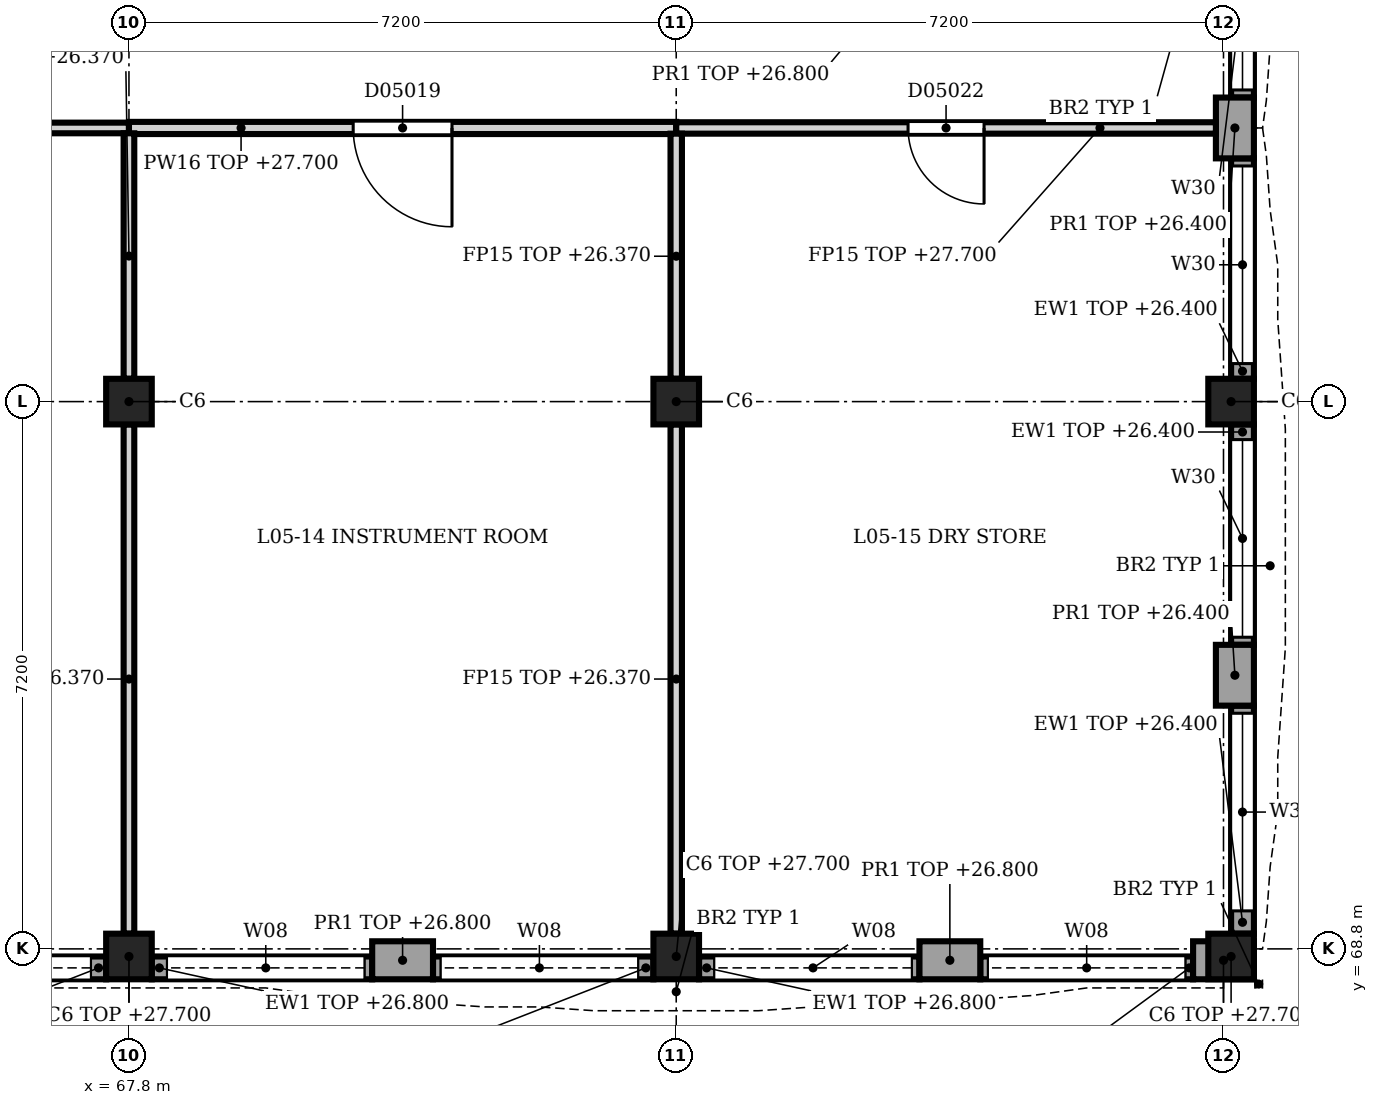
"""IFC4 building model, lengths in metres.
Left out: names, types, materials, properties, quantities, classifications, styles, units other than length and angle.
Written with IfcOpenShell. Run it as: python <this file> out.ifc"""

import sys

from ifc_helpers import new_model, si_unit, direction, frame, frame_2d, origin, origin_2d, place, context, subcontext, project, spatial, rectangle, extrude, element, fill, save


model = new_model("IFC4")
c1 = context("Model", 3, precision=1e-05, world=origin(), true_north=direction((0.0, 1.0)))
c2 = subcontext(c1, "Body", "Model", "MODEL_VIEW")
j1 = project(units=[si_unit("LENGTHUNIT", "METRE"), si_unit("PLANEANGLEUNIT", "RADIAN")], contexts=[c1])
p1 = place(None, origin())
s1 = spatial("IfcSite", under=j1, at=p1, CompositionType="ELEMENT")
p2 = place(p1, origin())
s2 = spatial("IfcBuilding", under=s1, at=p2, CompositionType="ELEMENT")
p3 = place(p2, frame((0.0, 0.0, 23.4)))
s3 = spatial("IfcBuildingStorey", under=s2, at=p3, CompositionType="ELEMENT", Elevation=23.4)
p4 = place(p3, frame((67.8, 68.7, 0.0), z_axis=(0.0, 0.0, 1.0), x_axis=(1.0, 0.0, 0.0)))
e1 = element("IfcColumn", 1, at=p4, inside=s3, PredefinedType="COLUMN", context=c2, shape_type="SweptSolid", body=[
    extrude(rectangle(XDim=0.6, YDim=0.6, at=origin_2d()), origin(), (0.0, 0.0, 1.0), 4.3),
])
p5 = place(p3, frame((67.8, 76.0, 0.0), z_axis=(0.0, 0.0, 1.0), x_axis=(1.0, 0.0, 0.0)))
e2 = element("IfcColumn", 2, at=p5, inside=s3, PredefinedType="COLUMN", context=c2, shape_type="SweptSolid", body=[
    extrude(rectangle(XDim=0.6, YDim=0.6, at=origin_2d()), origin(), (0.0, 0.0, 1.0), 4.5),
])
p6 = place(p3, frame((75.0, 68.7, 0.0), z_axis=(0.0, 0.0, 1.0), x_axis=(1.0, 0.0, 0.0)))
e3 = element("IfcColumn", 3, at=p6, inside=s3, PredefinedType="COLUMN", context=c2, shape_type="SweptSolid", body=[
    extrude(rectangle(XDim=0.6, YDim=0.6, at=origin_2d()), origin(), (0.0, 0.0, 1.0), 4.3),
])
p7 = place(p3, frame((75.0, 76.0, 0.0), z_axis=(0.0, 0.0, 1.0), x_axis=(1.0, 0.0, 0.0)))
e4 = element("IfcColumn", 4, at=p7, inside=s3, PredefinedType="COLUMN", context=c2, shape_type="SweptSolid", body=[
    extrude(rectangle(XDim=0.6, YDim=0.6, at=origin_2d()), origin(), (0.0, 0.0, 1.0), 4.5),
])
p8 = place(p3, frame((82.3, 68.7, 0.0), z_axis=(0.0, 0.0, 1.0), x_axis=(1.0, 0.0, 0.0)))
e5 = element("IfcColumn", 5, at=p8, inside=s3, PredefinedType="COLUMN", context=c2, shape_type="SweptSolid", body=[
    extrude(rectangle(XDim=0.6, YDim=0.6, at=origin_2d()), origin(), (0.0, 0.0, 1.0), 4.3),
])
p9 = place(p3, frame((82.3, 76.0, 0.0), z_axis=(0.0, 0.0, 1.0), x_axis=(1.0, 0.0, 0.0)))
e6 = element("IfcColumn", 6, at=p9, inside=s3, PredefinedType="COLUMN", context=c2, shape_type="SweptSolid", body=[
    extrude(rectangle(XDim=0.6, YDim=0.6, at=origin_2d()), origin(), (0.0, 0.0, 1.0), 4.5),
])
for number, where, z_axis, x_axis in (
    (7, (82.6, 68.65, 0.0), (0.0, 0.0, 1.0), (-1.0, 0.0, 0.0)),
    (8, (79.0, 68.65, 0.0), (0.0, 0.0, 1.0), (-1.0, 0.0, 0.0)),
    (9, (71.8, 68.65, 0.0), (0.0, 0.0, 1.0), (-1.0, 0.0, 0.0)),
):
    element("IfcWall", number, at=place(p3, frame(where, z_axis=z_axis, x_axis=x_axis)), inside=s3, PredefinedType="SOLIDWALL", context=c2, shape_type="SweptSolid", body=[
        extrude(rectangle(XDim=0.8, YDim=0.5, at=frame_2d((0.4, 0.0))), origin(), (0.0, 0.0, 1.0), 3.4),
    ])
p10 = place(p3, frame((81.8, 68.55, 0.0), z_axis=(0.0, 0.0, 1.0), x_axis=(-1.0, 0.0, 0.0)))
e10 = element("IfcWall", 10, at=p10, inside=s3, PredefinedType="SOLIDWALL", context=c2, shape_type="SweptSolid", body=[
    extrude(rectangle(XDim=2.8, YDim=0.3, at=frame_2d((1.4, 0.0))), origin(), (0.0, 0.0, 1.0), 3.4),
])
p11 = place(p10, frame((0.1, 0.0, 1.2)))
e11 = element("IfcOpeningElement", 11, at=p11, cuts=e10, PredefinedType="OPENING", context=c2, shape_type="SweptSolid", body=[
    extrude(rectangle(XDim=2.6, YDim=2.1, at=frame_2d((1.3, 1.05))), frame((0.0, 0.16, 0.0), z_axis=(0.0, -1.0, 0.0), x_axis=(1.0, 0.0, 0.0)), (0.0, 0.0, 1.0), 0.32),
])
p12 = place(p3, frame((78.2, 68.55, 0.0), z_axis=(0.0, 0.0, 1.0), x_axis=(-1.0, 0.0, 0.0)))
e12 = element("IfcWall", 12, at=p12, inside=s3, PredefinedType="SOLIDWALL", context=c2, shape_type="SweptSolid", body=[
    extrude(rectangle(XDim=2.9, YDim=0.3, at=frame_2d((1.45, 0.0))), origin(), (0.0, 0.0, 1.0), 3.4),
])
p13 = place(p12, frame((0.1, 0.0, 1.2)))
e13 = element("IfcOpeningElement", 13, at=p13, cuts=e12, PredefinedType="OPENING", context=c2, shape_type="SweptSolid", body=[
    extrude(rectangle(XDim=2.6, YDim=2.1, at=frame_2d((1.3, 1.05))), frame((0.0, 0.16, 0.0), z_axis=(0.0, -1.0, 0.0), x_axis=(1.0, 0.0, 0.0)), (0.0, 0.0, 1.0), 0.32),
])
p14 = place(p3, frame((74.7, 68.55, 0.0), z_axis=(0.0, 0.0, 1.0), x_axis=(-1.0, 0.0, 0.0)))
e14 = element("IfcWall", 14, at=p14, inside=s3, PredefinedType="SOLIDWALL", context=c2, shape_type="SweptSolid", body=[
    extrude(rectangle(XDim=2.9, YDim=0.3, at=frame_2d((1.45, 0.0))), origin(), (0.0, 0.0, 1.0), 3.4),
])
p15 = place(p14, frame((0.2, 0.0, 1.2)))
e15 = element("IfcOpeningElement", 15, at=p15, cuts=e14, PredefinedType="OPENING", context=c2, shape_type="SweptSolid", body=[
    extrude(rectangle(XDim=2.6, YDim=2.1, at=frame_2d((1.3, 1.05))), frame((0.0, 0.16, 0.0), z_axis=(0.0, -1.0, 0.0), x_axis=(1.0, 0.0, 0.0)), (0.0, 0.0, 1.0), 0.32),
])
p16 = place(p3, frame((71.0, 68.55, 0.0), z_axis=(0.0, 0.0, 1.0), x_axis=(-1.0, 0.0, 0.0)))
e16 = element("IfcWall", 16, at=p16, inside=s3, PredefinedType="SOLIDWALL", context=c2, shape_type="SweptSolid", body=[
    extrude(rectangle(XDim=2.9, YDim=0.3, at=frame_2d((1.45, 0.0))), origin(), (0.0, 0.0, 1.0), 3.4),
])
p17 = place(p16, frame((0.1, 0.0, 1.2)))
e17 = element("IfcOpeningElement", 17, at=p17, cuts=e16, PredefinedType="OPENING", context=c2, shape_type="SweptSolid", body=[
    extrude(rectangle(XDim=2.6, YDim=2.1, at=frame_2d((1.3, 1.05))), frame((0.0, 0.16, 0.0), z_axis=(0.0, -1.0, 0.0), x_axis=(1.0, 0.0, 0.0)), (0.0, 0.0, 1.0), 0.32),
])
p18 = place(p3, frame((67.5, 68.55, 0.0), z_axis=(0.0, 0.0, 1.0), x_axis=(-1.0, 0.0, 0.0)))
e18 = element("IfcWall", 18, at=p18, inside=s3, PredefinedType="SOLIDWALL", context=c2, shape_type="SweptSolid", body=[
    extrude(rectangle(XDim=2.9, YDim=0.3, at=frame_2d((1.45, 0.0))), origin(), (0.0, 0.0, 1.0), 3.4),
])
p19 = place(p18, frame((0.2, 0.0, 1.2)))
e19 = element("IfcOpeningElement", 19, at=p19, cuts=e18, PredefinedType="OPENING", context=c2, shape_type="SweptSolid", body=[
    extrude(rectangle(XDim=2.6, YDim=2.1, at=frame_2d((1.3, 1.05))), frame((0.0, 0.16, 0.0), z_axis=(0.0, -1.0, 0.0), x_axis=(1.0, 0.0, 0.0)), (0.0, 0.0, 1.0), 0.32),
])
for number, where, z_axis, x_axis in (
    (20, (82.35, 80.0, 0.0), (0.0, 0.0, 1.0), (0.0, -1.0, 0.0)),
    (21, (82.35, 72.8, 0.0), (0.0, 0.0, 1.0), (0.0, -1.0, 0.0)),
):
    element("IfcWall", number, at=place(p3, frame(where, z_axis=z_axis, x_axis=x_axis)), inside=s3, PredefinedType="SOLIDWALL", context=c2, shape_type="SweptSolid", body=[
        extrude(rectangle(XDim=0.8, YDim=0.5, at=frame_2d((0.4, 0.0))), origin(), (0.0, 0.0, 1.0), 3.0),
    ])
p20 = place(p3, frame((82.45, 82.9, 0.0), z_axis=(0.0, 0.0, 1.0), x_axis=(0.0, -1.0, 0.0)))
e22 = element("IfcWall", 22, at=p20, inside=s3, PredefinedType="SOLIDWALL", context=c2, shape_type="SweptSolid", body=[
    extrude(rectangle(XDim=2.9, YDim=0.3, at=frame_2d((1.45, 0.0))), origin(), (0.0, 0.0, 1.0), 3.0),
])
p21 = place(p20, frame((0.2, 0.0, 0.9)))
e23 = element("IfcOpeningElement", 23, at=p21, cuts=e22, PredefinedType="OPENING", context=c2, shape_type="SweptSolid", body=[
    extrude(rectangle(XDim=2.6, YDim=1.9, at=frame_2d((1.3, 0.95))), frame((0.0, 0.16, 0.0), z_axis=(0.0, -1.0, 0.0), x_axis=(1.0, 0.0, 0.0)), (0.0, 0.0, 1.0), 0.32),
])
p22 = place(p3, frame((82.45, 79.2, 0.0), z_axis=(0.0, 0.0, 1.0), x_axis=(0.0, -1.0, 0.0)))
e24 = element("IfcWall", 24, at=p22, inside=s3, PredefinedType="SOLIDWALL", context=c2, shape_type="SweptSolid", body=[
    extrude(rectangle(XDim=2.9, YDim=0.3, at=frame_2d((1.45, 0.0))), origin(), (0.0, 0.0, 1.0), 3.0),
])
p23 = place(p22, frame((0.1, 0.0, 0.9)))
e25 = element("IfcOpeningElement", 25, at=p23, cuts=e24, PredefinedType="OPENING", context=c2, shape_type="SweptSolid", body=[
    extrude(rectangle(XDim=2.6, YDim=1.9, at=frame_2d((1.3, 0.95))), frame((0.0, 0.16, 0.0), z_axis=(0.0, -1.0, 0.0), x_axis=(1.0, 0.0, 0.0)), (0.0, 0.0, 1.0), 0.32),
])
p24 = place(p3, frame((82.45, 75.7, 0.0), z_axis=(0.0, 0.0, 1.0), x_axis=(0.0, -1.0, 0.0)))
e26 = element("IfcWall", 26, at=p24, inside=s3, PredefinedType="SOLIDWALL", context=c2, shape_type="SweptSolid", body=[
    extrude(rectangle(XDim=2.9, YDim=0.3, at=frame_2d((1.45, 0.0))), origin(), (0.0, 0.0, 1.0), 3.0),
])
p25 = place(p24, frame((0.2, 0.0, 0.9)))
e27 = element("IfcOpeningElement", 27, at=p25, cuts=e26, PredefinedType="OPENING", context=c2, shape_type="SweptSolid", body=[
    extrude(rectangle(XDim=2.6, YDim=1.9, at=frame_2d((1.3, 0.95))), frame((0.0, 0.16, 0.0), z_axis=(0.0, -1.0, 0.0), x_axis=(1.0, 0.0, 0.0)), (0.0, 0.0, 1.0), 0.32),
])
p26 = place(p3, frame((82.45, 72.0, 0.0), z_axis=(0.0, 0.0, 1.0), x_axis=(0.0, -1.0, 0.0)))
e28 = element("IfcWall", 28, at=p26, inside=s3, PredefinedType="SOLIDWALL", context=c2, shape_type="SweptSolid", body=[
    extrude(rectangle(XDim=3.0, YDim=0.3, at=frame_2d((1.5, 0.0))), origin(), (0.0, 0.0, 1.0), 3.0),
])
p27 = place(p26, frame((0.1, 0.0, 0.9)))
e29 = element("IfcOpeningElement", 29, at=p27, cuts=e28, PredefinedType="OPENING", context=c2, shape_type="SweptSolid", body=[
    extrude(rectangle(XDim=2.6, YDim=1.9, at=frame_2d((1.3, 0.95))), frame((0.0, 0.16, 0.0), z_axis=(0.0, -1.0, 0.0), x_axis=(1.0, 0.0, 0.0)), (0.0, 0.0, 1.0), 0.32),
])
p28 = place(p3, frame((67.8, 79.6, 0.0), z_axis=(0.0, 0.0, 1.0), x_axis=(-1.0, 0.0, 0.0)))
e30 = element("IfcWall", 30, at=p28, inside=s3, PredefinedType="PARTITIONING", context=c2, shape_type="SweptSolid", body=[
    extrude(rectangle(XDim=14.4, YDim=0.14, at=frame_2d((7.2, 0.0))), origin(), (0.0, 0.0, 1.0), 2.97),
])
p29 = place(p28, frame((6.65, 0.0, 0.0)))
e31 = element("IfcOpeningElement", 31, at=p29, cuts=e30, PredefinedType="OPENING", context=c2, shape_type="SweptSolid", body=[
    extrude(rectangle(XDim=1.2, YDim=2.1, at=frame_2d((0.6, 1.05))), frame((0.0, 0.08, 0.0), z_axis=(0.0, -1.0, 0.0), x_axis=(1.0, 0.0, 0.0)), (0.0, 0.0, 1.0), 0.16),
])
p30 = place(p3, frame((75.0, 79.6, 0.0), z_axis=(0.0, 0.0, 1.0), x_axis=(-1.0, 0.0, 0.0)))
e32 = element("IfcWall", 32, at=p30, inside=s3, PredefinedType="PARTITIONING", context=c2, shape_type="SweptSolid", body=[
    extrude(rectangle(XDim=7.2, YDim=0.16, at=frame_2d((3.6, 0.0))), origin(), (0.0, 0.0, 1.0), 4.3),
])
p31 = place(p30, frame((2.95, 0.0, 0.0)))
e33 = element("IfcOpeningElement", 33, at=p31, cuts=e32, PredefinedType="OPENING", context=c2, shape_type="SweptSolid", body=[
    extrude(rectangle(XDim=1.3, YDim=2.2, at=frame_2d((0.65, 1.1))), frame((0.0, 0.09, 0.0), z_axis=(0.0, -1.0, 0.0), x_axis=(1.0, 0.0, 0.0)), (0.0, 0.0, 1.0), 0.18),
])
p32 = place(p3, frame((82.1, 79.6, 0.0), z_axis=(0.0, 0.0, 1.0), x_axis=(-1.0, 0.0, 0.0)))
e34 = element("IfcWall", 34, at=p32, inside=s3, PredefinedType="PARTITIONING", context=c2, shape_type="SweptSolid", body=[
    extrude(rectangle(XDim=7.1, YDim=0.15, at=frame_2d((3.55, 0.0))), origin(), (0.0, 0.0, 1.0), 4.3),
])
p33 = place(p32, frame((3.05, 0.0, 0.0)))
e35 = element("IfcOpeningElement", 35, at=p33, cuts=e34, PredefinedType="OPENING", context=c2, shape_type="SweptSolid", body=[
    extrude(rectangle(XDim=1.0, YDim=2.1, at=frame_2d((0.5, 1.05))), frame((0.0, 0.085, 0.0), z_axis=(0.0, -1.0, 0.0), x_axis=(1.0, 0.0, 0.0)), (0.0, 0.0, 1.0), 0.17),
])
p34 = place(p3, frame((67.8, 69.0, 0.0), z_axis=(0.0, 0.0, 1.0), x_axis=(0.0, 1.0, 0.0)))
e36 = element("IfcWall", 36, at=p34, inside=s3, PredefinedType="PARTITIONING", context=c2, shape_type="SweptSolid", body=[
    extrude(rectangle(XDim=6.7, YDim=0.14, at=frame_2d((3.35, 0.0))), origin(), (0.0, 0.0, 1.0), 2.97),
])
p35 = place(p3, frame((67.8, 76.3, 0.0), z_axis=(0.0, 0.0, 1.0), x_axis=(0.0, 1.0, 0.0)))
e37 = element("IfcWall", 37, at=p35, inside=s3, PredefinedType="PARTITIONING", context=c2, shape_type="SweptSolid", body=[
    extrude(rectangle(XDim=3.23, YDim=0.14, at=frame_2d((1.615, 0.0))), origin(), (0.0, 0.0, 1.0), 2.97),
])
p36 = place(p3, frame((75.0, 69.0, 0.0), z_axis=(0.0, 0.0, 1.0), x_axis=(0.0, 1.0, 0.0)))
e38 = element("IfcWall", 38, at=p36, inside=s3, PredefinedType="PARTITIONING", context=c2, shape_type="SweptSolid", body=[
    extrude(rectangle(XDim=6.7, YDim=0.15, at=frame_2d((3.35, 0.0))), origin(), (0.0, 0.0, 1.0), 2.97),
])
p37 = place(p3, frame((75.0, 76.3, 0.0), z_axis=(0.0, 0.0, 1.0), x_axis=(0.0, 1.0, 0.0)))
e39 = element("IfcWall", 39, at=p37, inside=s3, PredefinedType="PARTITIONING", context=c2, shape_type="SweptSolid", body=[
    extrude(rectangle(XDim=3.225, YDim=0.15, at=frame_2d((1.612, 0.0))), origin(), (0.0, 0.0, 1.0), 2.97),
])
p38 = place(p11, origin())
e40 = element("IfcWindow", 40, at=p38, inside=s3, PartitioningType="SINGLE_PANEL", PredefinedType="WINDOW", context=c2, shape_type="SweptSolid", body=[
    extrude(rectangle(XDim=2.6, YDim=2.1, at=frame_2d((1.3, 1.05))), frame((0.0, 0.03, 0.0), z_axis=(0.0, -1.0, 0.0), x_axis=(1.0, 0.0, 0.0)), (0.0, 0.0, 1.0), 0.06),
])
fill(e11, e40)
p39 = place(p13, origin())
e41 = element("IfcWindow", 41, at=p39, inside=s3, PartitioningType="SINGLE_PANEL", PredefinedType="WINDOW", context=c2, shape_type="SweptSolid", body=[
    extrude(rectangle(XDim=2.6, YDim=2.1, at=frame_2d((1.3, 1.05))), frame((0.0, 0.03, 0.0), z_axis=(0.0, -1.0, 0.0), x_axis=(1.0, 0.0, 0.0)), (0.0, 0.0, 1.0), 0.06),
])
fill(e13, e41)
p40 = place(p15, origin())
e42 = element("IfcWindow", 42, at=p40, inside=s3, PartitioningType="SINGLE_PANEL", PredefinedType="WINDOW", context=c2, shape_type="SweptSolid", body=[
    extrude(rectangle(XDim=2.6, YDim=2.1, at=frame_2d((1.3, 1.05))), frame((0.0, 0.03, 0.0), z_axis=(0.0, -1.0, 0.0), x_axis=(1.0, 0.0, 0.0)), (0.0, 0.0, 1.0), 0.06),
])
fill(e15, e42)
p41 = place(p17, origin())
e43 = element("IfcWindow", 43, at=p41, inside=s3, PartitioningType="SINGLE_PANEL", PredefinedType="WINDOW", context=c2, shape_type="SweptSolid", body=[
    extrude(rectangle(XDim=2.6, YDim=2.1, at=frame_2d((1.3, 1.05))), frame((0.0, 0.03, 0.0), z_axis=(0.0, -1.0, 0.0), x_axis=(1.0, 0.0, 0.0)), (0.0, 0.0, 1.0), 0.06),
])
fill(e17, e43)
p42 = place(p19, origin())
e44 = element("IfcWindow", 44, at=p42, inside=s3, PartitioningType="SINGLE_PANEL", PredefinedType="WINDOW", context=c2, shape_type="SweptSolid", body=[
    extrude(rectangle(XDim=2.6, YDim=2.1, at=frame_2d((1.3, 1.05))), frame((0.0, 0.03, 0.0), z_axis=(0.0, -1.0, 0.0), x_axis=(1.0, 0.0, 0.0)), (0.0, 0.0, 1.0), 0.06),
])
fill(e19, e44)
p43 = place(p21, origin())
e45 = element("IfcWindow", 45, at=p43, inside=s3, PartitioningType="SINGLE_PANEL", PredefinedType="WINDOW", context=c2, shape_type="SweptSolid", body=[
    extrude(rectangle(XDim=2.6, YDim=1.9, at=frame_2d((1.3, 0.95))), frame((0.0, 0.03, 0.0), z_axis=(0.0, -1.0, 0.0), x_axis=(1.0, 0.0, 0.0)), (0.0, 0.0, 1.0), 0.06),
])
fill(e23, e45)
p44 = place(p23, origin())
e46 = element("IfcWindow", 46, at=p44, inside=s3, PartitioningType="SINGLE_PANEL", PredefinedType="WINDOW", context=c2, shape_type="SweptSolid", body=[
    extrude(rectangle(XDim=2.6, YDim=1.9, at=frame_2d((1.3, 0.95))), frame((0.0, 0.03, 0.0), z_axis=(0.0, -1.0, 0.0), x_axis=(1.0, 0.0, 0.0)), (0.0, 0.0, 1.0), 0.06),
])
fill(e25, e46)
p45 = place(p25, origin())
e47 = element("IfcWindow", 47, at=p45, inside=s3, PartitioningType="SINGLE_PANEL", PredefinedType="WINDOW", context=c2, shape_type="SweptSolid", body=[
    extrude(rectangle(XDim=2.6, YDim=1.9, at=frame_2d((1.3, 0.95))), frame((0.0, 0.03, 0.0), z_axis=(0.0, -1.0, 0.0), x_axis=(1.0, 0.0, 0.0)), (0.0, 0.0, 1.0), 0.06),
])
fill(e27, e47)
p46 = place(p27, origin())
e48 = element("IfcWindow", 48, at=p46, inside=s3, PartitioningType="SINGLE_PANEL", PredefinedType="WINDOW", context=c2, shape_type="SweptSolid", body=[
    extrude(rectangle(XDim=2.6, YDim=1.9, at=frame_2d((1.3, 0.95))), frame((0.0, 0.03, 0.0), z_axis=(0.0, -1.0, 0.0), x_axis=(1.0, 0.0, 0.0)), (0.0, 0.0, 1.0), 0.06),
])
fill(e29, e48)
p47 = place(p31, origin())
e49 = element("IfcDoor", 49, at=p47, inside=s3, OperationType="SINGLE_SWING_LEFT", PredefinedType="DOOR", context=c2, shape_type="SweptSolid", body=[
    extrude(rectangle(XDim=1.3, YDim=2.2, at=frame_2d((0.65, 1.1))), frame((0.0, 0.025, 0.0), z_axis=(0.0, -1.0, 0.0), x_axis=(1.0, 0.0, 0.0)), (0.0, 0.0, 1.0), 0.05),
])
fill(e33, e49)
p48 = place(p33, origin())
e50 = element("IfcDoor", 50, at=p48, inside=s3, OperationType="SINGLE_SWING_RIGHT", PredefinedType="DOOR", context=c2, shape_type="SweptSolid", body=[
    extrude(rectangle(XDim=1.0, YDim=2.1, at=frame_2d((0.5, 1.05))), frame((0.0, 0.025, 0.0), z_axis=(0.0, -1.0, 0.0), x_axis=(1.0, 0.0, 0.0)), (0.0, 0.0, 1.0), 0.05),
])
fill(e35, e50)
save(model, sys.argv[1])
